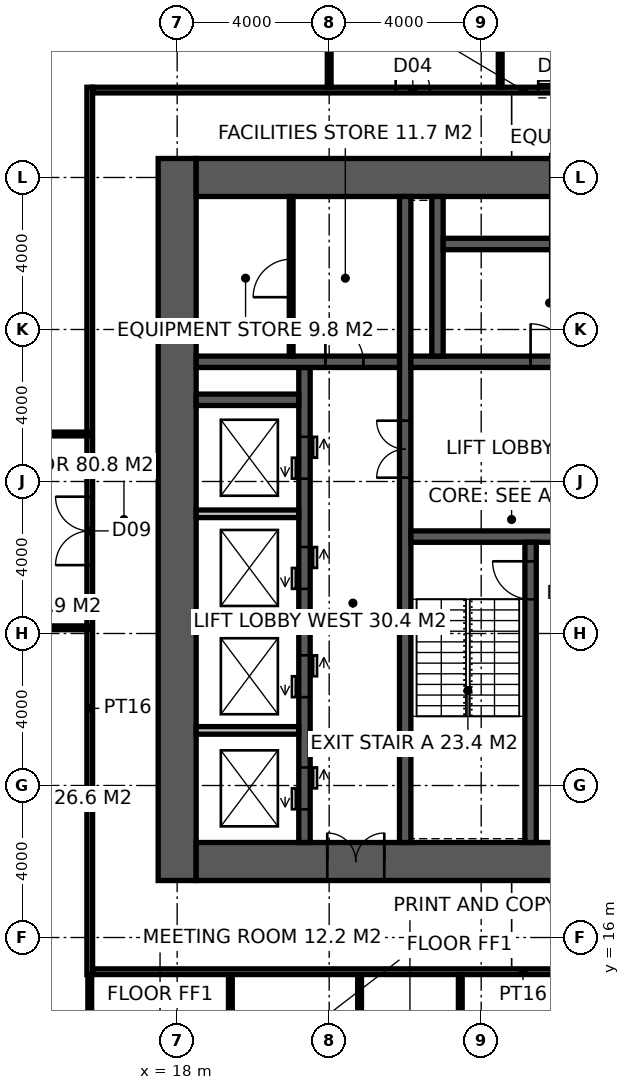
"""IFC4 building model, lengths in metres.
Left out: names, types, materials, properties, quantities, classifications, styles, units other than length and angle.
Written with IfcOpenShell. Run it as: python <this file> out.ifc"""

import sys

from ifc_helpers import new_model, si_unit, direction, frame, frame_2d, origin, place, context, subcontext, project, spatial, rectangle, extrude, element, fill, save


model = new_model("IFC4")
c1 = context("Model", 3, precision=1e-05, world=origin(), true_north=direction((0.0, 1.0)))
c2 = subcontext(c1, "Body", "Model", "MODEL_VIEW")
j1 = project(units=[si_unit("LENGTHUNIT", "METRE"), si_unit("PLANEANGLEUNIT", "RADIAN")], contexts=[c1])
p1 = place(None, origin())
s1 = spatial("IfcSite", under=j1, at=p1, CompositionType="ELEMENT")
p2 = place(p1, origin())
s2 = spatial("IfcBuilding", under=s1, at=p2, CompositionType="ELEMENT")
p3 = place(p2, frame((0.0, 0.0, 254.2)))
s3 = spatial("IfcBuildingStorey", under=s2, at=p3, CompositionType="ELEMENT", Elevation=254.2)
p4 = place(p3, frame((18.0, 17.5, -0.15), z_axis=(0.0, 0.0, 1.0), x_axis=(0.0, 1.0, 0.0)))
e1 = element("IfcWall", 1, at=p4, inside=s3, PredefinedType="SHEAR", context=c2, shape_type="SweptSolid", body=[
    extrude(rectangle(XDim=19.0, YDim=1.0, at=frame_2d((9.5, 0.0))), origin(), (0.0, 0.0, 1.0), 4.0),
])
p5 = place(p3, frame((18.5, 18.0, -0.15), z_axis=(0.0, 0.0, 1.0), x_axis=(1.0, 0.0, 0.0)))
e2 = element("IfcWall", 2, at=p5, inside=s3, PredefinedType="SHEAR", context=c2, shape_type="SweptSolid", body=[
    extrude(rectangle(XDim=17.6, YDim=1.0, at=frame_2d((8.8, 0.0))), origin(), (0.0, 0.0, 1.0), 4.0),
])
p6 = place(p5, frame((3.45, 0.0, 0.15)))
e3 = element("IfcOpeningElement", 3, at=p6, cuts=e2, PredefinedType="OPENING", context=c2, shape_type="SweptSolid", body=[
    extrude(rectangle(XDim=1.5, YDim=2.4, at=frame_2d((0.75, 1.2))), frame((0.0, 0.51, 0.0), z_axis=(0.0, -1.0, 0.0), x_axis=(1.0, 0.0, 0.0)), (0.0, 0.0, 1.0), 1.02),
])
p7 = place(p3, frame((18.5, 36.0, -0.15), z_axis=(0.0, 0.0, 1.0), x_axis=(1.0, 0.0, 0.0)))
e4 = element("IfcWall", 4, at=p7, inside=s3, PredefinedType="SHEAR", context=c2, shape_type="SweptSolid", body=[
    extrude(rectangle(XDim=17.6, YDim=1.0, at=frame_2d((8.8, 0.0))), origin(), (0.0, 0.0, 1.0), 4.0),
])
p8 = place(p3, frame((24.0, 18.5, -0.15), z_axis=(0.0, 0.0, 1.0), x_axis=(0.0, 1.0, 0.0)))
e5 = element("IfcWall", 5, at=p8, inside=s3, PredefinedType="SHEAR", context=c2, shape_type="SweptSolid", body=[
    extrude(rectangle(XDim=17.0, YDim=0.3, at=frame_2d((8.5, 0.0))), origin(), (0.0, 0.0, 1.0), 4.0),
])
p9 = place(p8, frame((9.6, 0.0, 0.15)))
e6 = element("IfcOpeningElement", 6, at=p9, cuts=e5, PredefinedType="OPENING", context=c2, shape_type="SweptSolid", body=[
    extrude(rectangle(XDim=1.5, YDim=2.4, at=frame_2d((0.75, 1.2))), frame((0.0, 0.16, 0.0), z_axis=(0.0, -1.0, 0.0), x_axis=(1.0, 0.0, 0.0)), (0.0, 0.0, 1.0), 0.32),
])
p10 = place(p3, frame((24.15, 26.55, -0.15), z_axis=(0.0, 0.0, 1.0), x_axis=(1.0, 0.0, 0.0)))
e7 = element("IfcWall", 7, at=p10, inside=s3, PredefinedType="SHEAR", context=c2, shape_type="SweptSolid", body=[
    extrude(rectangle(XDim=11.25, YDim=0.3, at=frame_2d((5.625, 0.0))), origin(), (0.0, 0.0, 1.0), 4.0),
])
p11 = place(p10, frame((9.25, 0.0, 0.15)))
e8 = element("IfcOpeningElement", 8, at=p11, cuts=e7, PredefinedType="OPENING", context=c2, shape_type="SweptSolid", body=[
    extrude(rectangle(XDim=1.0, YDim=2.2, at=frame_2d((0.5, 1.1))), frame((0.0, 0.16, 0.0), z_axis=(0.0, -1.0, 0.0), x_axis=(1.0, 0.0, 0.0)), (0.0, 0.0, 1.0), 0.32),
])
p12 = place(p10, frame((4.9, 0.0, 0.15)))
e9 = element("IfcOpeningElement", 9, at=p12, cuts=e7, PredefinedType="OPENING", context=c2, shape_type="SweptSolid", body=[
    extrude(rectangle(XDim=1.5, YDim=2.4, at=frame_2d((0.75, 1.2))), frame((0.0, 0.16, 0.0), z_axis=(0.0, -1.0, 0.0), x_axis=(1.0, 0.0, 0.0)), (0.0, 0.0, 1.0), 0.32),
])
p13 = place(p3, frame((27.3, 18.5, -0.15), z_axis=(0.0, 0.0, 1.0), x_axis=(0.0, 1.0, 0.0)))
e10 = element("IfcWall", 10, at=p13, inside=s3, PredefinedType="SHEAR", context=c2, shape_type="SweptSolid", body=[
    extrude(rectangle(XDim=7.9, YDim=0.3, at=frame_2d((3.95, 0.0))), origin(), (0.0, 0.0, 1.0), 4.0),
])
p14 = place(p13, frame((6.4, 0.0, 0.15)))
e11 = element("IfcOpeningElement", 11, at=p14, cuts=e10, PredefinedType="OPENING", context=c2, shape_type="SweptSolid", body=[
    extrude(rectangle(XDim=1.0, YDim=2.2, at=frame_2d((0.5, 1.1))), frame((0.0, 0.16, 0.0), z_axis=(0.0, -1.0, 0.0), x_axis=(1.0, 0.0, 0.0)), (0.0, 0.0, 1.0), 0.32),
])
p15 = place(p3, frame((24.15, 31.15, -0.15), z_axis=(0.0, 0.0, 1.0), x_axis=(1.0, 0.0, 0.0)))
e12 = element("IfcWall", 12, at=p15, inside=s3, PredefinedType="SHEAR", context=c2, shape_type="SweptSolid", body=[
    extrude(rectangle(XDim=11.25, YDim=0.3, at=frame_2d((5.625, 0.0))), origin(), (0.0, 0.0, 1.0), 4.0),
])
p16 = place(p15, frame((3.15, 0.0, 0.15)))
e13 = element("IfcOpeningElement", 13, at=p16, cuts=e12, PredefinedType="OPENING", context=c2, shape_type="SweptSolid", body=[
    extrude(rectangle(XDim=1.0, YDim=2.2, at=frame_2d((0.5, 1.1))), frame((0.0, 0.16, 0.0), z_axis=(0.0, -1.0, 0.0), x_axis=(1.0, 0.0, 0.0)), (0.0, 0.0, 1.0), 0.32),
])
p17 = place(p15, frame((7.25, 0.0, 0.15)))
e14 = element("IfcOpeningElement", 14, at=p17, cuts=e12, PredefinedType="OPENING", context=c2, shape_type="SweptSolid", body=[
    extrude(rectangle(XDim=1.4, YDim=2.4, at=frame_2d((0.7, 1.2))), frame((0.0, 0.16, 0.0), z_axis=(0.0, -1.0, 0.0), x_axis=(1.0, 0.0, 0.0)), (0.0, 0.0, 1.0), 0.32),
])
p18 = place(p3, frame((21.35, 18.5, -0.15), z_axis=(0.0, 0.0, 1.0), x_axis=(0.0, 1.0, 0.0)))
e15 = element("IfcWall", 15, at=p18, inside=s3, PredefinedType="SHEAR", context=c2, shape_type="SweptSolid", body=[
    extrude(rectangle(XDim=12.5, YDim=0.3, at=frame_2d((6.25, 0.0))), origin(), (0.0, 0.0, 1.0), 4.0),
])
p19 = place(p18, frame((0.875, 0.0, 0.15)))
e16 = element("IfcOpeningElement", 16, at=p19, cuts=e15, PredefinedType="OPENING", context=c2, shape_type="SweptSolid", body=[
    extrude(rectangle(XDim=1.1, YDim=2.2, at=frame_2d((0.55, 1.1))), frame((0.0, 0.16, 0.0), z_axis=(0.0, -1.0, 0.0), x_axis=(1.0, 0.0, 0.0)), (0.0, 0.0, 1.0), 0.32),
])
p20 = place(p18, frame((3.825, 0.0, 0.15)))
e17 = element("IfcOpeningElement", 17, at=p20, cuts=e15, PredefinedType="OPENING", context=c2, shape_type="SweptSolid", body=[
    extrude(rectangle(XDim=1.1, YDim=2.2, at=frame_2d((0.55, 1.1))), frame((0.0, 0.16, 0.0), z_axis=(0.0, -1.0, 0.0), x_axis=(1.0, 0.0, 0.0)), (0.0, 0.0, 1.0), 0.32),
])
p21 = place(p18, frame((6.675, 0.0, 0.15)))
e18 = element("IfcOpeningElement", 18, at=p21, cuts=e15, PredefinedType="OPENING", context=c2, shape_type="SweptSolid", body=[
    extrude(rectangle(XDim=1.1, YDim=2.2, at=frame_2d((0.55, 1.1))), frame((0.0, 0.16, 0.0), z_axis=(0.0, -1.0, 0.0), x_axis=(1.0, 0.0, 0.0)), (0.0, 0.0, 1.0), 0.32),
])
p22 = place(p18, frame((9.575, 0.0, 0.15)))
e19 = element("IfcOpeningElement", 19, at=p22, cuts=e15, PredefinedType="OPENING", context=c2, shape_type="SweptSolid", body=[
    extrude(rectangle(XDim=1.1, YDim=2.2, at=frame_2d((0.55, 1.1))), frame((0.0, 0.16, 0.0), z_axis=(0.0, -1.0, 0.0), x_axis=(1.0, 0.0, 0.0)), (0.0, 0.0, 1.0), 0.32),
])
p23 = place(p3, frame((18.5, 31.15, -0.15), z_axis=(0.0, 0.0, 1.0), x_axis=(1.0, 0.0, 0.0)))
e20 = element("IfcWall", 20, at=p23, inside=s3, PredefinedType="SHEAR", context=c2, shape_type="SweptSolid", body=[
    extrude(rectangle(XDim=5.35, YDim=0.3, at=frame_2d((2.675, 0.0))), origin(), (0.0, 0.0, 1.0), 4.0),
])
p24 = place(p23, frame((3.4, 0.0, 0.15)))
e21 = element("IfcOpeningElement", 21, at=p24, cuts=e20, PredefinedType="OPENING", context=c2, shape_type="SweptSolid", body=[
    extrude(rectangle(XDim=1.0, YDim=2.2, at=frame_2d((0.5, 1.1))), frame((0.0, 0.16, 0.0), z_axis=(0.0, -1.0, 0.0), x_axis=(1.0, 0.0, 0.0)), (0.0, 0.0, 1.0), 0.32),
])
p25 = place(p3, frame((18.5, 30.15, -0.15), z_axis=(0.0, 0.0, 1.0), x_axis=(1.0, 0.0, 0.0)))
e22 = element("IfcWall", 22, at=p25, inside=s3, PredefinedType="SHEAR", context=c2, shape_type="SweptSolid", body=[
    extrude(rectangle(XDim=2.7, YDim=0.3, at=frame_2d((1.35, 0.0))), origin(), (0.0, 0.0, 1.0), 4.0),
])
p26 = place(p3, frame((24.85, 31.3, -0.15), z_axis=(0.0, 0.0, 1.0), x_axis=(0.0, 1.0, 0.0)))
e23 = element("IfcWall", 23, at=p26, inside=s3, PredefinedType="SHEAR", context=c2, shape_type="SweptSolid", body=[
    extrude(rectangle(XDim=4.2, YDim=0.3, at=frame_2d((2.1, 0.0))), origin(), (0.0, 0.0, 1.0), 4.0),
])
p27 = place(p3, frame((25.0, 34.25, -0.15), z_axis=(0.0, 0.0, 1.0), x_axis=(1.0, 0.0, 0.0)))
e24 = element("IfcWall", 24, at=p27, inside=s3, PredefinedType="SHEAR", context=c2, shape_type="SweptSolid", body=[
    extrude(rectangle(XDim=8.6, YDim=0.3, at=frame_2d((4.3, 0.0))), origin(), (0.0, 0.0, 1.0), 4.0),
])
for number, where, z_axis, x_axis in (
    (25, (18.5, 21.45, -0.15), (0.0, 0.0, 1.0), (1.0, 0.0, 0.0)),
    (26, (18.5, 24.3, -0.15), (0.0, 0.0, 1.0), (1.0, 0.0, 0.0)),
    (27, (18.5, 27.15, -0.15), (0.0, 0.0, 1.0), (1.0, 0.0, 0.0)),
):
    element("IfcWall", number, at=place(p3, frame(where, z_axis=z_axis, x_axis=x_axis)), inside=s3, PredefinedType="SOLIDWALL", context=c2, shape_type="SweptSolid", body=[
        extrude(rectangle(XDim=2.7, YDim=0.2, at=frame_2d((1.35, 0.0))), origin(), (0.0, 0.0, 1.0), 4.0),
    ])
p28 = place(p3, frame((21.0, 31.3, 0.0), z_axis=(0.0, 0.0, 1.0), x_axis=(0.0, 1.0, 0.0)))
e28 = element("IfcWall", 28, at=p28, inside=s3, PredefinedType="PARTITIONING", context=c2, shape_type="SweptSolid", body=[
    extrude(rectangle(XDim=4.2, YDim=0.1, at=frame_2d((2.1, 0.0))), origin(), (0.0, 0.0, 1.0), 3.85),
])
p29 = place(p28, frame((1.55, 0.0, 0.0)))
e29 = element("IfcOpeningElement", 29, at=p29, cuts=e28, PredefinedType="OPENING", context=c2, shape_type="SweptSolid", body=[
    extrude(rectangle(XDim=1.0, YDim=2.2, at=frame_2d((0.5, 1.1))), frame((0.0, 0.06, 0.0), z_axis=(0.0, -1.0, 0.0), x_axis=(1.0, 0.0, 0.0)), (0.0, 0.0, 1.0), 0.12),
])
p30 = place(p3, frame((15.7, 15.025, 0.0), z_axis=(0.0, 0.0, 1.0), x_axis=(0.0, 1.0, 0.0)))
e30 = element("IfcWall", 30, at=p30, inside=s3, PredefinedType="PARTITIONING", context=c2, shape_type="SweptSolid", body=[
    extrude(rectangle(XDim=23.35, YDim=0.15, at=frame_2d((11.675, 0.0))), origin(), (0.0, 0.0, 1.0), 3.85),
])
p31 = place(p30, frame((10.775, 0.0, 0.0)))
e31 = element("IfcOpeningElement", 31, at=p31, cuts=e30, PredefinedType="OPENING", context=c2, shape_type="SweptSolid", body=[
    extrude(rectangle(XDim=1.8, YDim=2.4, at=frame_2d((0.9, 1.2))), frame((0.0, 0.085, 0.0), z_axis=(0.0, -1.0, 0.0), x_axis=(1.0, 0.0, 0.0)), (0.0, 0.0, 1.0), 0.17),
])
p32 = place(p3, frame((15.775, 15.1, 0.0), z_axis=(0.0, 0.0, 1.0), x_axis=(1.0, 0.0, 0.0)))
e32 = element("IfcWall", 32, at=p32, inside=s3, PredefinedType="PARTITIONING", context=c2, shape_type="SweptSolid", body=[
    extrude(rectangle(XDim=22.65, YDim=0.15, at=frame_2d((11.325, 0.0))), origin(), (0.0, 0.0, 1.0), 3.85),
])
p33 = place(p3, frame((15.775, 38.3, 0.0), z_axis=(0.0, 0.0, 1.0), x_axis=(1.0, 0.0, 0.0)))
e33 = element("IfcWall", 33, at=p33, inside=s3, PredefinedType="PARTITIONING", context=c2, shape_type="SweptSolid", body=[
    extrude(rectangle(XDim=22.65, YDim=0.15, at=frame_2d((11.325, 0.0))), origin(), (0.0, 0.0, 1.0), 3.85),
])
p34 = place(p33, frame((7.975, 0.0, 0.0)))
e34 = element("IfcOpeningElement", 34, at=p34, cuts=e33, PredefinedType="OPENING", context=c2, shape_type="SweptSolid", body=[
    extrude(rectangle(XDim=0.9, YDim=2.1, at=frame_2d((0.45, 1.05))), frame((0.0, 0.085, 0.0), z_axis=(0.0, -1.0, 0.0), x_axis=(1.0, 0.0, 0.0)), (0.0, 0.0, 1.0), 0.17),
])
p35 = place(p33, frame((11.725, 0.0, 0.0)))
e35 = element("IfcOpeningElement", 35, at=p35, cuts=e33, PredefinedType="OPENING", context=c2, shape_type="SweptSolid", body=[
    extrude(rectangle(XDim=1.0, YDim=2.1, at=frame_2d((0.5, 1.05))), frame((0.0, 0.085, 0.0), z_axis=(0.0, -1.0, 0.0), x_axis=(1.0, 0.0, 0.0)), (0.0, 0.0, 1.0), 0.17),
])
p36 = place(p33, frame((15.575, 0.0, 0.0)))
e36 = element("IfcOpeningElement", 36, at=p36, cuts=e33, PredefinedType="OPENING", context=c2, shape_type="SweptSolid", body=[
    extrude(rectangle(XDim=0.9, YDim=2.1, at=frame_2d((0.45, 1.05))), frame((0.0, 0.085, 0.0), z_axis=(0.0, -1.0, 0.0), x_axis=(1.0, 0.0, 0.0)), (0.0, 0.0, 1.0), 0.17),
])
p37 = place(p3, frame((22.0, 38.375, 0.0), z_axis=(0.0, 0.0, 1.0), x_axis=(0.0, 1.0, 0.0)))
e37 = element("IfcWall", 37, at=p37, inside=s3, PredefinedType="PARTITIONING", context=c2, shape_type="SweptSolid", body=[
    extrude(rectangle(XDim=3.675, YDim=0.1, at=frame_2d((1.837, 0.0))), origin(), (0.0, 0.0, 1.0), 2.95),
])
p38 = place(p3, frame((26.5, 38.375, 0.0), z_axis=(0.0, 0.0, 1.0), x_axis=(0.0, 1.0, 0.0)))
e38 = element("IfcWall", 38, at=p38, inside=s3, PredefinedType="PARTITIONING", context=c2, shape_type="SweptSolid", body=[
    extrude(rectangle(XDim=3.575, YDim=0.1, at=frame_2d((1.788, 0.0))), origin(), (0.0, 0.0, 1.0), 3.85),
])
for number, where, z_axis, x_axis in (
    (39, (15.7, 11.55, 0.0), (0.0, 0.0, 1.0), (0.0, 1.0, 0.0)),
    (40, (19.4, 11.55, 0.0), (0.0, 0.0, 1.0), (0.0, 1.0, 0.0)),
    (41, (22.8, 11.55, 0.0), (0.0, 0.0, 1.0), (0.0, 1.0, 0.0)),
    (42, (25.45, 11.55, 0.0), (0.0, 0.0, 1.0), (0.0, 1.0, 0.0)),
):
    element("IfcWall", number, at=place(p3, frame(where, z_axis=z_axis, x_axis=x_axis)), inside=s3, PredefinedType="PARTITIONING", context=c2, shape_type="SweptSolid", body=[
        extrude(rectangle(XDim=3.475, YDim=0.1, at=frame_2d((1.737, 0.0))), origin(), (0.0, 0.0, 1.0), 3.85),
    ])
p39 = place(p3, frame((15.7, 29.25, 0.0), z_axis=(0.0, 0.0, 1.0), x_axis=(-1.0, 0.0, 0.0)))
e43 = element("IfcWall", 43, at=p39, inside=s3, PredefinedType="PARTITIONING", context=c2, shape_type="SweptSolid", body=[
    extrude(rectangle(XDim=4.5, YDim=0.1, at=frame_2d((2.25, 0.0))), origin(), (0.0, 0.0, 1.0), 3.85),
])
p40 = place(p3, frame((11.2, 24.15, 0.0), z_axis=(0.0, 0.0, 1.0), x_axis=(1.0, 0.0, 0.0)))
e44 = element("IfcWall", 44, at=p40, inside=s3, PredefinedType="PARTITIONING", context=c2, shape_type="SweptSolid", body=[
    extrude(rectangle(XDim=4.5, YDim=0.1, at=frame_2d((2.25, 0.0))), origin(), (0.0, 0.0, 1.0), 2.95),
])
p41 = place(p14, origin())
e45 = element("IfcDoor", 45, at=p41, inside=s3, OperationType="SINGLE_SWING_RIGHT", PredefinedType="DOOR", context=c2, shape_type="SweptSolid", body=[
    extrude(rectangle(XDim=1.0, YDim=2.2, at=frame_2d((0.5, 1.1))), frame((0.0, 0.025, 0.0), z_axis=(0.0, -1.0, 0.0), x_axis=(1.0, 0.0, 0.0)), (0.0, 0.0, 1.0), 0.05),
])
fill(e11, e45)
p42 = place(p9, origin())
e46 = element("IfcDoor", 46, at=p42, inside=s3, OperationType="DOUBLE_DOOR_DOUBLE_SWING", PredefinedType="DOOR", context=c2, shape_type="SweptSolid", body=[
    extrude(rectangle(XDim=1.5, YDim=2.4, at=frame_2d((0.75, 1.2))), frame((0.0, 0.025, 0.0), z_axis=(0.0, -1.0, 0.0), x_axis=(1.0, 0.0, 0.0)), (0.0, 0.0, 1.0), 0.05),
])
fill(e6, e46)
p43 = place(p24, origin())
e47 = element("IfcDoor", 47, at=p43, inside=s3, OperationType="SINGLE_SWING_LEFT", PredefinedType="DOOR", context=c2, shape_type="SweptSolid", body=[
    extrude(rectangle(XDim=1.0, YDim=2.2, at=frame_2d((0.5, 1.1))), frame((0.0, 0.025, 0.0), z_axis=(0.0, -1.0, 0.0), x_axis=(1.0, 0.0, 0.0)), (0.0, 0.0, 1.0), 0.05),
])
fill(e21, e47)
p44 = place(p29, origin())
e48 = element("IfcDoor", 48, at=p44, inside=s3, OperationType="SINGLE_SWING_LEFT", PredefinedType="DOOR", context=c2, shape_type="SweptSolid", body=[
    extrude(rectangle(XDim=1.0, YDim=2.2, at=frame_2d((0.5, 1.1))), frame((0.0, 0.025, 0.0), z_axis=(0.0, -1.0, 0.0), x_axis=(1.0, 0.0, 0.0)), (0.0, 0.0, 1.0), 0.05),
])
fill(e29, e48)
p45 = place(p16, origin())
e49 = element("IfcDoor", 49, at=p45, inside=s3, OperationType="SINGLE_SWING_LEFT", PredefinedType="DOOR", context=c2, shape_type="SweptSolid", body=[
    extrude(rectangle(XDim=1.0, YDim=2.2, at=frame_2d((0.5, 1.1))), frame((0.0, 0.025, 0.0), z_axis=(0.0, -1.0, 0.0), x_axis=(1.0, 0.0, 0.0)), (0.0, 0.0, 1.0), 0.05),
])
fill(e13, e49)
p46 = place(p6, origin())
e50 = element("IfcDoor", 50, at=p46, inside=s3, OperationType="DOUBLE_DOOR_DOUBLE_SWING", PredefinedType="DOOR", context=c2, shape_type="SweptSolid", body=[
    extrude(rectangle(XDim=1.5, YDim=2.4, at=frame_2d((0.75, 1.2))), frame((0.0, 0.025, 0.0), z_axis=(0.0, -1.0, 0.0), x_axis=(1.0, 0.0, 0.0)), (0.0, 0.0, 1.0), 0.05),
])
fill(e3, e50)
p47 = place(p34, origin())
e51 = element("IfcDoor", 51, at=p47, inside=s3, OperationType="SINGLE_SWING_LEFT", PredefinedType="DOOR", context=c2, shape_type="SweptSolid", body=[
    extrude(rectangle(XDim=0.9, YDim=2.1, at=frame_2d((0.45, 1.05))), frame((0.0, 0.025, 0.0), z_axis=(0.0, -1.0, 0.0), x_axis=(1.0, 0.0, 0.0)), (0.0, 0.0, 1.0), 0.05),
])
fill(e34, e51)
p48 = place(p35, origin())
e52 = element("IfcDoor", 52, at=p48, inside=s3, OperationType="SLIDING_TO_LEFT", PredefinedType="DOOR", context=c2, shape_type="SweptSolid", body=[
    extrude(rectangle(XDim=1.0, YDim=2.1, at=frame_2d((0.5, 1.05))), frame((0.0, 0.025, 0.0), z_axis=(0.0, -1.0, 0.0), x_axis=(1.0, 0.0, 0.0)), (0.0, 0.0, 1.0), 0.05),
])
fill(e35, e52)
p49 = place(p31, origin())
e53 = element("IfcDoor", 53, at=p49, inside=s3, OperationType="DOUBLE_DOOR_DOUBLE_SWING", PredefinedType="DOOR", context=c2, shape_type="SweptSolid", body=[
    extrude(rectangle(XDim=1.8, YDim=2.4, at=frame_2d((0.9, 1.2))), frame((0.0, 0.025, 0.0), z_axis=(0.0, -1.0, 0.0), x_axis=(1.0, 0.0, 0.0)), (0.0, 0.0, 1.0), 0.05),
])
fill(e31, e53)
p50 = place(p19, origin())
e54 = element("IfcDoor", 54, at=p50, inside=s3, OperationType="DOUBLE_DOOR_SLIDING", PredefinedType="DOOR", context=c2, shape_type="SweptSolid", body=[
    extrude(rectangle(XDim=1.1, YDim=2.2, at=frame_2d((0.55, 1.1))), frame((0.0, 0.025, 0.0), z_axis=(0.0, -1.0, 0.0), x_axis=(1.0, 0.0, 0.0)), (0.0, 0.0, 1.0), 0.05),
])
fill(e16, e54)
p51 = place(p20, origin())
e55 = element("IfcDoor", 55, at=p51, inside=s3, OperationType="DOUBLE_DOOR_SLIDING", PredefinedType="DOOR", context=c2, shape_type="SweptSolid", body=[
    extrude(rectangle(XDim=1.1, YDim=2.2, at=frame_2d((0.55, 1.1))), frame((0.0, 0.025, 0.0), z_axis=(0.0, -1.0, 0.0), x_axis=(1.0, 0.0, 0.0)), (0.0, 0.0, 1.0), 0.05),
])
fill(e17, e55)
p52 = place(p21, origin())
e56 = element("IfcDoor", 56, at=p52, inside=s3, OperationType="DOUBLE_DOOR_SLIDING", PredefinedType="DOOR", context=c2, shape_type="SweptSolid", body=[
    extrude(rectangle(XDim=1.1, YDim=2.2, at=frame_2d((0.55, 1.1))), frame((0.0, 0.025, 0.0), z_axis=(0.0, -1.0, 0.0), x_axis=(1.0, 0.0, 0.0)), (0.0, 0.0, 1.0), 0.05),
])
fill(e18, e56)
p53 = place(p22, origin())
e57 = element("IfcDoor", 57, at=p53, inside=s3, OperationType="DOUBLE_DOOR_SLIDING", PredefinedType="DOOR", context=c2, shape_type="SweptSolid", body=[
    extrude(rectangle(XDim=1.1, YDim=2.2, at=frame_2d((0.55, 1.1))), frame((0.0, 0.025, 0.0), z_axis=(0.0, -1.0, 0.0), x_axis=(1.0, 0.0, 0.0)), (0.0, 0.0, 1.0), 0.05),
])
fill(e19, e57)
save(model, sys.argv[1])
